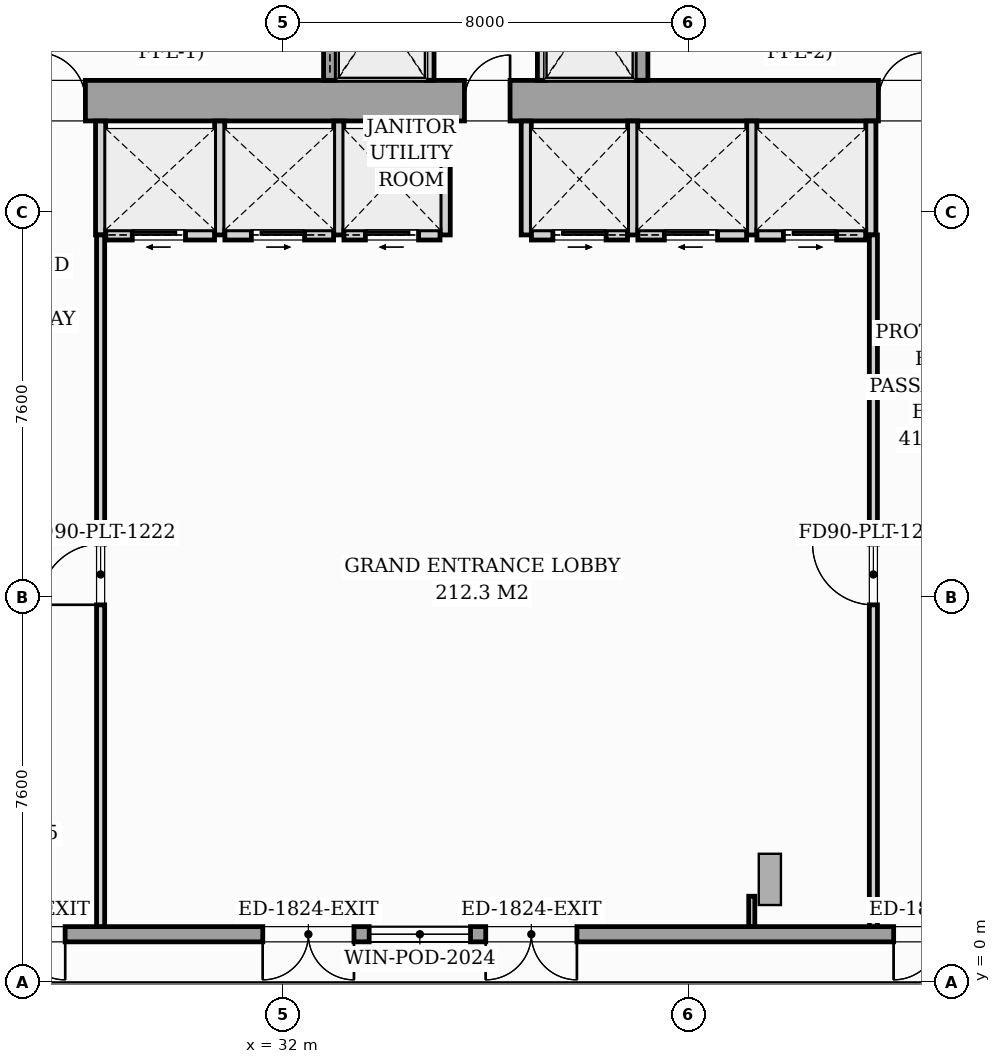
"""IFC4 building model, lengths in metres.
Left out: names, types, materials, properties, quantities, classifications, styles, units other than length and angle.
Written with IfcOpenShell. Run it as: python <this file> out.ifc"""

import sys

from ifc_helpers import new_model, si_unit, direction, frame, frame_2d, origin, origin_2d, place, context, subcontext, project, spatial, rectangle, i_section, extrude, source, transform, mapped, element, fill, save


model = new_model("IFC4")
c1 = context("Model", 3, precision=1e-05, world=origin(), true_north=direction((0.0, 1.0)))
c2 = subcontext(c1, "Body", "Model", "MODEL_VIEW")
j1 = project(units=[si_unit("LENGTHUNIT", "METRE"), si_unit("PLANEANGLEUNIT", "RADIAN")], contexts=[c1])
p1 = place(None, origin())
s1 = spatial("IfcSite", under=j1, at=p1, CompositionType="ELEMENT")
p2 = place(p1, origin())
s2 = spatial("IfcBuilding", under=s1, at=p2, CompositionType="ELEMENT")
p3 = place(p2, origin())
s3 = spatial("IfcBuildingStorey", under=s2, at=p3, CompositionType="ELEMENT", Elevation=0.0)
m1 = source(origin(), c2, "Body", "SweptSolid", [
    extrude(i_section(OverallWidth=0.437, OverallDepth=0.514, WebThickness=0.061, FlangeThickness=0.097, FilletRadius=0.018, at=origin_2d()), origin(), (0.0, 0.0, 1.0), 4.996),
])
for number, where, z_axis, x_axis in (
    (1, (33.12, 17.4, 0.002), (0.0, 0.0, 1.0), (1.0, 0.0, 0.0)),
    (2, (38.88, 17.4, 0.002), (0.0, 0.0, 1.0), (1.0, 0.0, 0.0)),
):
    element("IfcColumn", number, at=place(p3, frame(where, z_axis=z_axis, x_axis=x_axis)), inside=s3, PredefinedType="PILASTER", context=c2, shape_type="MappedRepresentation", body=[
        mapped(m1, transform((0.0, 0.0, 0.0), scale=1.0)),
    ])
m2 = source(origin(), c2, "Body", "SweptSolid", [
    extrude(i_section(OverallWidth=0.438, OverallDepth=1.011, WebThickness=0.041, FlangeThickness=0.074, FilletRadius=0.024, at=origin_2d()), origin(), (0.0, 0.0, 1.0), 4.654),
])
p4 = place(p3, frame((41.974, 1.983, 0.081), z_axis=(-0.310977922628, 0.041495198515, 0.949510863623), x_axis=(0.94116917589, -0.12558448349, 0.313734154758)))
e3 = element("IfcColumn", 3, at=p4, inside=s3, PredefinedType="COLUMN", context=c2, shape_type="MappedRepresentation", body=[
    mapped(m2, transform((0.0, 0.0, 0.0), scale=1.0)),
])
p5 = place(p3, frame((47.0, 0.95, 0.0), z_axis=(0.0, 0.0, 1.0), x_axis=(-1.0, 0.0, 0.0)))
e4 = element("IfcWall", 4, at=p5, inside=s3, PredefinedType="STANDARD", context=c2, shape_type="SweptSolid", body=[
    extrude(rectangle(XDim=29.0, YDim=0.3, at=frame_2d((14.5, 0.0))), origin(), (0.0, 0.0, 1.0), 4.58),
])
p6 = place(p5, frame((1.15, 0.0, 0.0)))
e5 = element("IfcOpeningElement", 5, at=p6, cuts=e4, PredefinedType="OPENING", context=c2, shape_type="SweptSolid", body=[
    extrude(rectangle(XDim=1.8, YDim=2.4, at=frame_2d((0.9, 1.2))), frame((0.0, 0.16, 0.0), z_axis=(0.0, -1.0, 0.0), x_axis=(1.0, 0.0, 0.0)), (0.0, 0.0, 1.0), 0.32),
])
p7 = place(p5, frame((9.2, 0.0, 0.0)))
e6 = element("IfcOpeningElement", 6, at=p7, cuts=e4, PredefinedType="OPENING", context=c2, shape_type="SweptSolid", body=[
    extrude(rectangle(XDim=1.8, YDim=2.4, at=frame_2d((0.9, 1.2))), frame((0.0, 0.16, 0.0), z_axis=(0.0, -1.0, 0.0), x_axis=(1.0, 0.0, 0.0)), (0.0, 0.0, 1.0), 0.32),
])
p8 = place(p5, frame((11.3, 0.0, 0.65)))
e7 = element("IfcOpeningElement", 7, at=p8, cuts=e4, PredefinedType="OPENING", context=c2, shape_type="SweptSolid", body=[
    extrude(rectangle(XDim=2.0, YDim=2.4, at=frame_2d((1.0, 1.2))), frame((0.0, 0.16, 0.0), z_axis=(0.0, -1.0, 0.0), x_axis=(1.0, 0.0, 0.0)), (0.0, 0.0, 1.0), 0.32),
])
p9 = place(p5, frame((13.6, 0.0, 0.0)))
e8 = element("IfcOpeningElement", 8, at=p9, cuts=e4, PredefinedType="OPENING", context=c2, shape_type="SweptSolid", body=[
    extrude(rectangle(XDim=1.8, YDim=2.4, at=frame_2d((0.9, 1.2))), frame((0.0, 0.16, 0.0), z_axis=(0.0, -1.0, 0.0), x_axis=(1.0, 0.0, 0.0)), (0.0, 0.0, 1.0), 0.32),
])
p10 = place(p5, frame((19.3, 0.0, 0.0)))
e9 = element("IfcOpeningElement", 9, at=p10, cuts=e4, PredefinedType="OPENING", context=c2, shape_type="SweptSolid", body=[
    extrude(rectangle(XDim=1.8, YDim=2.4, at=frame_2d((0.9, 1.2))), frame((0.0, 0.16, 0.0), z_axis=(0.0, -1.0, 0.0), x_axis=(1.0, 0.0, 0.0)), (0.0, 0.0, 1.0), 0.32),
])
p11 = place(p5, frame((26.8, 0.0, 0.0)))
e10 = element("IfcOpeningElement", 10, at=p11, cuts=e4, PredefinedType="OPENING", context=c2, shape_type="SweptSolid", body=[
    extrude(rectangle(XDim=1.0, YDim=2.2, at=frame_2d((0.5, 1.1))), frame((0.0, 0.16, 0.0), z_axis=(0.0, -1.0, 0.0), x_axis=(1.0, 0.0, 0.0)), (0.0, 0.0, 1.0), 0.32),
])
p12 = place(p3, frame((26.0, 17.4, 0.0), z_axis=(0.0, 0.0, 1.0), x_axis=(1.0, 0.0, 0.0)))
e11 = element("IfcWall", 11, at=p12, inside=s3, PredefinedType="SHEAR", context=c2, shape_type="SweptSolid", body=[
    extrude(rectangle(XDim=20.0, YDim=0.8, at=frame_2d((10.0, 0.0))), origin(), (0.0, 0.0, 1.0), 5.0),
])
p13 = place(p12, frame((1.15, 0.0, 0.0)))
e12 = element("IfcOpeningElement", 12, at=p13, cuts=e11, PredefinedType="OPENING", context=c2, shape_type="SweptSolid", body=[
    extrude(rectangle(XDim=0.95, YDim=2.06, at=frame_2d((0.475, 1.03))), frame((0.0, 0.41, 0.0), z_axis=(0.0, -1.0, 0.0), x_axis=(1.0, 0.0, 0.0)), (0.0, 0.0, 1.0), 0.82),
])
p14 = place(p12, frame((9.58, 0.0, 0.0)))
e13 = element("IfcOpeningElement", 13, at=p14, cuts=e11, PredefinedType="OPENING", context=c2, shape_type="SweptSolid", body=[
    extrude(rectangle(XDim=0.9, YDim=2.06, at=frame_2d((0.45, 1.03))), frame((0.0, 0.41, 0.0), z_axis=(0.0, -1.0, 0.0), x_axis=(1.0, 0.0, 0.0)), (0.0, 0.0, 1.0), 0.82),
])
p15 = place(p12, frame((17.75, 0.0, 0.0)))
e14 = element("IfcOpeningElement", 14, at=p15, cuts=e11, PredefinedType="OPENING", context=c2, shape_type="SweptSolid", body=[
    extrude(rectangle(XDim=0.95, YDim=2.06, at=frame_2d((0.475, 1.03))), frame((0.0, 0.41, 0.0), z_axis=(0.0, -1.0, 0.0), x_axis=(1.0, 0.0, 0.0)), (0.0, 0.0, 1.0), 0.82),
])
p16 = place(p3, frame((32.925, 17.802, 0.0), z_axis=(0.0, 0.0, 1.0), x_axis=(0.0, 1.0, 0.0)))
e15 = element("IfcWall", 15, at=p16, inside=s3, PredefinedType="SOLIDWALL", context=c2, shape_type="SweptSolid", body=[
    extrude(rectangle(XDim=2.646, YDim=0.25, at=frame_2d((1.323, 0.0))), origin(), (0.0, 0.0, 1.0), 5.0),
])
p17 = place(p16, frame((0.648, 0.0, 0.0)))
e16 = element("IfcOpeningElement", 16, at=p17, cuts=e15, PredefinedType="OPENING", context=c2, shape_type="SweptSolid", body=[
    extrude(rectangle(XDim=1.1, YDim=2.08, at=frame_2d((0.55, 1.04))), frame((0.0, 0.135, 0.0), z_axis=(0.0, -1.0, 0.0), x_axis=(1.0, 0.0, 0.0)), (0.0, 0.0, 1.0), 0.27),
])
for number, where, z_axis, x_axis in (
    (17, (34.9, 17.802, 0.0), (0.0, 0.0, 1.0), (0.0, 1.0, 0.0)),
    (18, (37.1, 17.802, 0.0), (0.0, 0.0, 1.0), (0.0, 1.0, 0.0)),
):
    element("IfcWall", number, at=place(p3, frame(where, z_axis=z_axis, x_axis=x_axis)), inside=s3, PredefinedType="PARTITIONING", context=c2, shape_type="SweptSolid", body=[
        extrude(rectangle(XDim=2.646, YDim=0.16, at=frame_2d((1.323, 0.0))), origin(), (0.0, 0.0, 1.0), 4.58),
    ])
p18 = place(p3, frame((39.075, 17.802, 0.0), z_axis=(0.0, 0.0, 1.0), x_axis=(0.0, 1.0, 0.0)))
e19 = element("IfcWall", 19, at=p18, inside=s3, PredefinedType="SOLIDWALL", context=c2, shape_type="SweptSolid", body=[
    extrude(rectangle(XDim=2.646, YDim=0.25, at=frame_2d((1.323, 0.0))), origin(), (0.0, 0.0, 1.0), 5.0),
])
p19 = place(p18, frame((0.648, 0.0, 0.0)))
e20 = element("IfcOpeningElement", 20, at=p19, cuts=e19, PredefinedType="OPENING", context=c2, shape_type="SweptSolid", body=[
    extrude(rectangle(XDim=1.1, YDim=2.08, at=frame_2d((0.55, 1.04))), frame((0.0, 0.135, 0.0), z_axis=(0.0, -1.0, 0.0), x_axis=(1.0, 0.0, 0.0)), (0.0, 0.0, 1.0), 0.27),
])
for number, where, z_axis, x_axis in (
    (21, (28.4, 14.75, 0.0), (0.0, 0.0, 1.0), (0.0, 1.0, 0.0)),
    (22, (30.75, 14.75, 0.0), (0.0, 0.0, 1.0), (0.0, 1.0, 0.0)),
    (23, (33.1, 14.75, 0.0), (0.0, 0.0, 1.0), (0.0, 1.0, 0.0)),
):
    element("IfcWall", number, at=place(p3, frame(where, z_axis=z_axis, x_axis=x_axis)), inside=s3, PredefinedType="PARTITIONING", context=c2, shape_type="SweptSolid", body=[
        extrude(rectangle(XDim=2.248, YDim=0.2, at=frame_2d((1.124, 0.0))), origin(), (0.0, 0.0, 1.0), 4.58),
    ])
p20 = place(p3, frame((28.502, 14.75, 0.0), z_axis=(0.0, 0.0, 1.0), x_axis=(1.0, 0.0, 0.0)))
e24 = element("IfcWall", 24, at=p20, inside=s3, PredefinedType="PARTITIONING", context=c2, shape_type="SweptSolid", body=[
    extrude(rectangle(XDim=2.146, YDim=0.2, at=frame_2d((1.073, 0.0))), origin(), (0.0, 0.0, 1.0), 4.58),
])
p21 = place(p20, frame((0.523, 0.0, 0.0)))
e25 = element("IfcOpeningElement", 25, at=p21, cuts=e24, PredefinedType="OPENING", context=c2, shape_type="SweptSolid", body=[
    extrude(rectangle(XDim=1.05, YDim=2.08, at=frame_2d((0.525, 1.04))), frame((0.0, 0.11, 0.0), z_axis=(0.0, -1.0, 0.0), x_axis=(1.0, 0.0, 0.0)), (0.0, 0.0, 1.0), 0.22),
])
p22 = place(p3, frame((30.852, 14.75, 0.0), z_axis=(0.0, 0.0, 1.0), x_axis=(1.0, 0.0, 0.0)))
e26 = element("IfcWall", 26, at=p22, inside=s3, PredefinedType="PARTITIONING", context=c2, shape_type="SweptSolid", body=[
    extrude(rectangle(XDim=2.146, YDim=0.2, at=frame_2d((1.073, 0.0))), origin(), (0.0, 0.0, 1.0), 4.58),
])
p23 = place(p22, frame((0.523, 0.0, 0.0)))
e27 = element("IfcOpeningElement", 27, at=p23, cuts=e26, PredefinedType="OPENING", context=c2, shape_type="SweptSolid", body=[
    extrude(rectangle(XDim=1.05, YDim=2.08, at=frame_2d((0.525, 1.04))), frame((0.0, 0.11, 0.0), z_axis=(0.0, -1.0, 0.0), x_axis=(1.0, 0.0, 0.0)), (0.0, 0.0, 1.0), 0.22),
])
p24 = place(p3, frame((35.2, 14.75, 0.0), z_axis=(0.0, 0.0, 1.0), x_axis=(0.0, 1.0, 0.0)))
e28 = element("IfcWall", 28, at=p24, inside=s3, PredefinedType="PARTITIONING", context=c2, shape_type="SweptSolid", body=[
    extrude(rectangle(XDim=2.248, YDim=0.2, at=frame_2d((1.124, 0.0))), origin(), (0.0, 0.0, 1.0), 4.58),
])
p25 = place(p3, frame((33.202, 14.75, 0.0), z_axis=(0.0, 0.0, 1.0), x_axis=(1.0, 0.0, 0.0)))
e29 = element("IfcWall", 29, at=p25, inside=s3, PredefinedType="PARTITIONING", context=c2, shape_type="SweptSolid", body=[
    extrude(rectangle(XDim=1.896, YDim=0.2, at=frame_2d((0.948, 0.0))), origin(), (0.0, 0.0, 1.0), 4.58),
])
p26 = place(p25, frame((0.423, 0.0, 0.0)))
e30 = element("IfcOpeningElement", 30, at=p26, cuts=e29, PredefinedType="OPENING", context=c2, shape_type="SweptSolid", body=[
    extrude(rectangle(XDim=1.05, YDim=2.08, at=frame_2d((0.525, 1.04))), frame((0.0, 0.11, 0.0), z_axis=(0.0, -1.0, 0.0), x_axis=(1.0, 0.0, 0.0)), (0.0, 0.0, 1.0), 0.22),
])
for number, where, z_axis, x_axis in (
    (31, (36.8, 14.75, 0.0), (0.0, 0.0, 1.0), (0.0, 1.0, 0.0)),
    (32, (38.9, 14.75, 0.0), (0.0, 0.0, 1.0), (0.0, 1.0, 0.0)),
):
    element("IfcWall", number, at=place(p3, frame(where, z_axis=z_axis, x_axis=x_axis)), inside=s3, PredefinedType="PARTITIONING", context=c2, shape_type="SweptSolid", body=[
        extrude(rectangle(XDim=2.248, YDim=0.2, at=frame_2d((1.124, 0.0))), origin(), (0.0, 0.0, 1.0), 4.58),
    ])
p27 = place(p3, frame((36.902, 14.75, 0.0), z_axis=(0.0, 0.0, 1.0), x_axis=(1.0, 0.0, 0.0)))
e33 = element("IfcWall", 33, at=p27, inside=s3, PredefinedType="PARTITIONING", context=c2, shape_type="SweptSolid", body=[
    extrude(rectangle(XDim=1.896, YDim=0.2, at=frame_2d((0.948, 0.0))), origin(), (0.0, 0.0, 1.0), 4.58),
])
p28 = place(p27, frame((0.423, 0.0, 0.0)))
e34 = element("IfcOpeningElement", 34, at=p28, cuts=e33, PredefinedType="OPENING", context=c2, shape_type="SweptSolid", body=[
    extrude(rectangle(XDim=1.05, YDim=2.08, at=frame_2d((0.525, 1.04))), frame((0.0, 0.11, 0.0), z_axis=(0.0, -1.0, 0.0), x_axis=(1.0, 0.0, 0.0)), (0.0, 0.0, 1.0), 0.22),
])
for number, where, z_axis, x_axis in (
    (35, (41.25, 14.75, 0.0), (0.0, 0.0, 1.0), (0.0, 1.0, 0.0)),
    (36, (43.6, 14.75, 0.0), (0.0, 0.0, 1.0), (0.0, 1.0, 0.0)),
):
    element("IfcWall", number, at=place(p3, frame(where, z_axis=z_axis, x_axis=x_axis)), inside=s3, PredefinedType="PARTITIONING", context=c2, shape_type="SweptSolid", body=[
        extrude(rectangle(XDim=2.248, YDim=0.2, at=frame_2d((1.124, 0.0))), origin(), (0.0, 0.0, 1.0), 4.58),
    ])
p29 = place(p3, frame((39.002, 14.75, 0.0), z_axis=(0.0, 0.0, 1.0), x_axis=(1.0, 0.0, 0.0)))
e37 = element("IfcWall", 37, at=p29, inside=s3, PredefinedType="PARTITIONING", context=c2, shape_type="SweptSolid", body=[
    extrude(rectangle(XDim=2.146, YDim=0.2, at=frame_2d((1.073, 0.0))), origin(), (0.0, 0.0, 1.0), 4.58),
])
p30 = place(p29, frame((0.523, 0.0, 0.0)))
e38 = element("IfcOpeningElement", 38, at=p30, cuts=e37, PredefinedType="OPENING", context=c2, shape_type="SweptSolid", body=[
    extrude(rectangle(XDim=1.05, YDim=2.08, at=frame_2d((0.525, 1.04))), frame((0.0, 0.11, 0.0), z_axis=(0.0, -1.0, 0.0), x_axis=(1.0, 0.0, 0.0)), (0.0, 0.0, 1.0), 0.22),
])
p31 = place(p3, frame((41.352, 14.75, 0.0), z_axis=(0.0, 0.0, 1.0), x_axis=(1.0, 0.0, 0.0)))
e39 = element("IfcWall", 39, at=p31, inside=s3, PredefinedType="PARTITIONING", context=c2, shape_type="SweptSolid", body=[
    extrude(rectangle(XDim=2.146, YDim=0.2, at=frame_2d((1.073, 0.0))), origin(), (0.0, 0.0, 1.0), 4.58),
])
p32 = place(p31, frame((0.523, 0.0, 0.0)))
e40 = element("IfcOpeningElement", 40, at=p32, cuts=e39, PredefinedType="OPENING", context=c2, shape_type="SweptSolid", body=[
    extrude(rectangle(XDim=1.05, YDim=2.08, at=frame_2d((0.525, 1.04))), frame((0.0, 0.11, 0.0), z_axis=(0.0, -1.0, 0.0), x_axis=(1.0, 0.0, 0.0)), (0.0, 0.0, 1.0), 0.22),
])
p33 = place(p3, frame((28.4, 1.102, 0.0), z_axis=(0.0, 0.0, 1.0), x_axis=(0.0, 1.0, 0.0)))
e41 = element("IfcWall", 41, at=p33, inside=s3, PredefinedType="PARTITIONING", context=c2, shape_type="SweptSolid", body=[
    extrude(rectangle(XDim=13.648, YDim=0.16, at=frame_2d((6.824, 0.0))), origin(), (0.0, 0.0, 1.0), 4.58),
])
p34 = place(p33, frame((6.348, 0.0, 0.0)))
e42 = element("IfcOpeningElement", 42, at=p34, cuts=e41, PredefinedType="OPENING", context=c2, shape_type="SweptSolid", body=[
    extrude(rectangle(XDim=1.2, YDim=2.08, at=frame_2d((0.6, 1.04))), frame((0.0, 0.09, 0.0), z_axis=(0.0, -1.0, 0.0), x_axis=(1.0, 0.0, 0.0)), (0.0, 0.0, 1.0), 0.18),
])
p35 = place(p3, frame((43.65, 1.102, 0.0), z_axis=(0.0, 0.0, 1.0), x_axis=(0.0, 1.0, 0.0)))
e43 = element("IfcWall", 43, at=p35, inside=s3, PredefinedType="PARTITIONING", context=c2, shape_type="SweptSolid", body=[
    extrude(rectangle(XDim=13.648, YDim=0.16, at=frame_2d((6.824, 0.0))), origin(), (0.0, 0.0, 1.0), 4.58),
])
p36 = place(p35, frame((6.348, 0.0, 0.0)))
e44 = element("IfcOpeningElement", 44, at=p36, cuts=e43, PredefinedType="OPENING", context=c2, shape_type="SweptSolid", body=[
    extrude(rectangle(XDim=1.2, YDim=2.08, at=frame_2d((0.6, 1.04))), frame((0.0, 0.09, 0.0), z_axis=(0.0, -1.0, 0.0), x_axis=(1.0, 0.0, 0.0)), (0.0, 0.0, 1.0), 0.18),
])
p37 = place(p3, frame((41.25, 1.7, 0.0), z_axis=(0.0, 0.0, 1.0), x_axis=(0.0, -1.0, 0.0)))
e45 = element("IfcWall", 45, at=p37, inside=s3, PredefinedType="PARTITIONING", context=c2, shape_type="SweptSolid", body=[
    extrude(rectangle(XDim=0.598, YDim=0.12, at=frame_2d((0.299, 0.0))), origin(), (0.0, 0.0, 1.0), 4.58),
])
m3 = source(origin(), c2, "Body", "SweptSolid", [
    extrude(rectangle(XDim=1.8, YDim=2.4, at=frame_2d((0.9, 1.2))), frame((0.0, 0.025, 0.0), z_axis=(0.0, -1.0, 0.0), x_axis=(1.0, 0.0, 0.0)), (0.0, 0.0, 1.0), 0.05),
])
p38 = place(p6, origin())
e46 = element("IfcDoor", 46, at=p38, inside=s3, OperationType="DOUBLE_DOOR_SINGLE_SWING", PredefinedType="DOOR", context=c2, shape_type="MappedRepresentation", body=[
    mapped(m3, transform((0.0, 0.0, 0.0), scale=1.0)),
])
fill(e5, e46)
p39 = place(p7, origin())
e47 = element("IfcDoor", 47, at=p39, inside=s3, OperationType="DOUBLE_DOOR_SINGLE_SWING", PredefinedType="DOOR", context=c2, shape_type="MappedRepresentation", body=[
    mapped(m3, transform((0.0, 0.0, 0.0), scale=1.0)),
])
fill(e6, e47)
m4 = source(origin(), c2, "Body", "SweptSolid", [
    extrude(rectangle(XDim=2.0, YDim=2.4, at=frame_2d((1.0, 1.2))), frame((0.0, 0.03, 0.0), z_axis=(0.0, -1.0, 0.0), x_axis=(1.0, 0.0, 0.0)), (0.0, 0.0, 1.0), 0.06),
])
p40 = place(p8, origin())
e48 = element("IfcWindow", 48, at=p40, inside=s3, PartitioningType="SINGLE_PANEL", PredefinedType="WINDOW", context=c2, shape_type="MappedRepresentation", body=[
    mapped(m4, transform((0.0, 0.0, 0.0), scale=1.0)),
])
fill(e7, e48)
p41 = place(p9, origin())
e49 = element("IfcDoor", 49, at=p41, inside=s3, OperationType="DOUBLE_DOOR_SINGLE_SWING", PredefinedType="DOOR", context=c2, shape_type="MappedRepresentation", body=[
    mapped(m3, transform((0.0, 0.0, 0.0), scale=1.0)),
])
fill(e8, e49)
p42 = place(p10, origin())
e50 = element("IfcDoor", 50, at=p42, inside=s3, OperationType="DOUBLE_DOOR_SINGLE_SWING", PredefinedType="DOOR", context=c2, shape_type="MappedRepresentation", body=[
    mapped(m3, transform((0.0, 0.0, 0.0), scale=1.0)),
])
fill(e9, e50)
m5 = source(origin(), c2, "Body", "SweptSolid", [
    extrude(rectangle(XDim=0.95, YDim=2.06, at=frame_2d((0.475, 1.03))), frame((0.0, 0.025, 0.0), z_axis=(0.0, -1.0, 0.0), x_axis=(1.0, 0.0, 0.0)), (0.0, 0.0, 1.0), 0.05),
])
p43 = place(p13, origin())
e51 = element("IfcDoor", 51, at=p43, inside=s3, OperationType="SINGLE_SWING_LEFT", PredefinedType="DOOR", context=c2, shape_type="MappedRepresentation", body=[
    mapped(m5, transform((0.0, 0.0, 0.0), scale=1.0)),
])
fill(e12, e51)
m6 = source(origin(), c2, "Body", "SweptSolid", [
    extrude(rectangle(XDim=0.9, YDim=2.06, at=frame_2d((0.45, 1.03))), frame((0.0, 0.025, 0.0), z_axis=(0.0, -1.0, 0.0), x_axis=(1.0, 0.0, 0.0)), (0.0, 0.0, 1.0), 0.05),
])
p44 = place(p14, origin())
e52 = element("IfcDoor", 52, at=p44, inside=s3, OperationType="SINGLE_SWING_RIGHT", PredefinedType="DOOR", context=c2, shape_type="MappedRepresentation", body=[
    mapped(m6, transform((0.0, 0.0, 0.0), scale=1.0)),
])
fill(e13, e52)
p45 = place(p15, origin())
e53 = element("IfcDoor", 53, at=p45, inside=s3, OperationType="SINGLE_SWING_RIGHT", PredefinedType="DOOR", context=c2, shape_type="MappedRepresentation", body=[
    mapped(m5, transform((0.0, 0.0, 0.0), scale=1.0)),
])
fill(e14, e53)
m7 = source(origin(), c2, "Body", "SweptSolid", [
    extrude(rectangle(XDim=1.05, YDim=2.08, at=frame_2d((0.525, 1.04))), frame((0.0, 0.025, 0.0), z_axis=(0.0, -1.0, 0.0), x_axis=(1.0, 0.0, 0.0)), (0.0, 0.0, 1.0), 0.05),
])
p46 = place(p21, origin())
e54 = element("IfcDoor", 54, at=p46, inside=s3, OperationType="SLIDING_TO_LEFT", PredefinedType="DOOR", context=c2, shape_type="MappedRepresentation", body=[
    mapped(m7, transform((0.0, 0.0, 0.0), scale=1.0)),
])
fill(e25, e54)
p47 = place(p23, origin())
e55 = element("IfcDoor", 55, at=p47, inside=s3, OperationType="SLIDING_TO_RIGHT", PredefinedType="DOOR", context=c2, shape_type="MappedRepresentation", body=[
    mapped(m7, transform((0.0, 0.0, 0.0), scale=1.0)),
])
fill(e27, e55)
p48 = place(p26, origin())
e56 = element("IfcDoor", 56, at=p48, inside=s3, OperationType="SLIDING_TO_LEFT", PredefinedType="DOOR", context=c2, shape_type="MappedRepresentation", body=[
    mapped(m7, transform((0.0, 0.0, 0.0), scale=1.0)),
])
fill(e30, e56)
p49 = place(p28, origin())
e57 = element("IfcDoor", 57, at=p49, inside=s3, OperationType="SLIDING_TO_RIGHT", PredefinedType="DOOR", context=c2, shape_type="MappedRepresentation", body=[
    mapped(m7, transform((0.0, 0.0, 0.0), scale=1.0)),
])
fill(e34, e57)
p50 = place(p30, origin())
e58 = element("IfcDoor", 58, at=p50, inside=s3, OperationType="SLIDING_TO_LEFT", PredefinedType="DOOR", context=c2, shape_type="MappedRepresentation", body=[
    mapped(m7, transform((0.0, 0.0, 0.0), scale=1.0)),
])
fill(e38, e58)
p51 = place(p32, origin())
e59 = element("IfcDoor", 59, at=p51, inside=s3, OperationType="SLIDING_TO_RIGHT", PredefinedType="DOOR", context=c2, shape_type="MappedRepresentation", body=[
    mapped(m7, transform((0.0, 0.0, 0.0), scale=1.0)),
])
fill(e40, e59)
m8 = source(origin(), c2, "Body", "SweptSolid", [
    extrude(rectangle(XDim=1.2, YDim=2.08, at=frame_2d((0.6, 1.04))), frame((0.0, 0.025, 0.0), z_axis=(0.0, -1.0, 0.0), x_axis=(1.0, 0.0, 0.0)), (0.0, 0.0, 1.0), 0.05),
])
p52 = place(p34, origin())
e60 = element("IfcDoor", 60, at=p52, inside=s3, OperationType="SINGLE_SWING_LEFT", PredefinedType="DOOR", context=c2, shape_type="MappedRepresentation", body=[
    mapped(m8, transform((0.0, 0.0, 0.0), scale=1.0)),
])
fill(e42, e60)
p53 = place(p36, origin())
e61 = element("IfcDoor", 61, at=p53, inside=s3, OperationType="SINGLE_SWING_RIGHT", PredefinedType="DOOR", context=c2, shape_type="MappedRepresentation", body=[
    mapped(m8, transform((0.0, 0.0, 0.0), scale=1.0)),
])
fill(e44, e61)
save(model, sys.argv[1])
